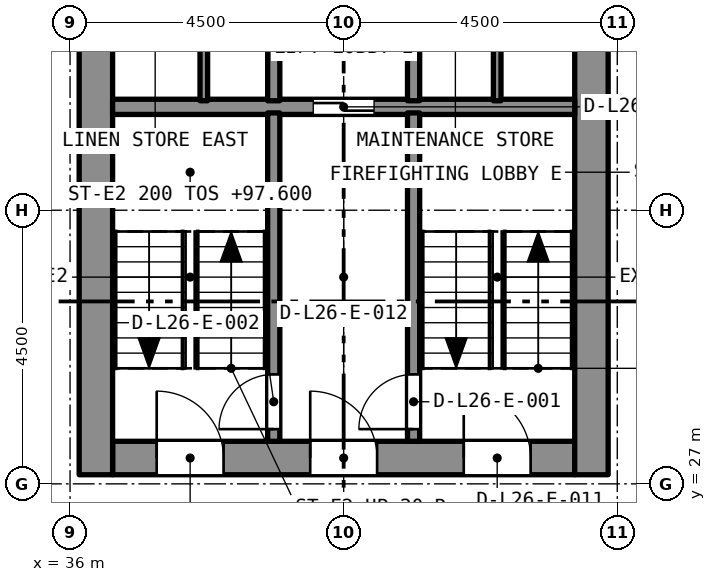
"""IFC4 building model, lengths in metres.
Left out: names, types, materials, properties, quantities, classifications, styles, units other than length and angle.
Written with IfcOpenShell. Run it as: python <this file> out.ifc"""

import sys

from ifc_helpers import new_model, si_unit, direction, frame, frame_2d, origin, place, context, subcontext, project, spatial, rectangle, extrude, element, fill, save


model = new_model("IFC4")
c1 = context("Model", 3, precision=1e-05, world=origin(), true_north=direction((0.0, 1.0)))
c2 = subcontext(c1, "Body", "Model", "MODEL_VIEW")
j1 = project(units=[si_unit("LENGTHUNIT", "METRE"), si_unit("PLANEANGLEUNIT", "RADIAN")], contexts=[c1])
p1 = place(None, origin())
s1 = spatial("IfcSite", under=j1, at=p1, CompositionType="ELEMENT")
p2 = place(p1, origin())
s2 = spatial("IfcBuilding", under=s1, at=p2, CompositionType="ELEMENT")
p3 = place(p2, frame((0.0, 0.0, 96.0)))
s3 = spatial("IfcBuildingStorey", under=s2, at=p3, CompositionType="ELEMENT", Elevation=96.0)
p4 = place(p3, frame((36.7, 27.425, 0.0), z_axis=(0.0, 0.0, 1.0), x_axis=(1.0, 0.0, 0.0)))
e1 = element("IfcWall", 1, at=p4, inside=s3, PredefinedType="SOLIDWALL", context=c2, shape_type="SweptSolid", body=[
    extrude(rectangle(XDim=7.6, YDim=0.55, at=frame_2d((3.8, 0.0))), origin(), (0.0, 0.0, 1.0), 3.2),
])
p5 = place(p4, frame((5.775, 0.0, 0.0)))
e2 = element("IfcOpeningElement", 2, at=p5, cuts=e1, PredefinedType="OPENING", context=c2, shape_type="SweptSolid", body=[
    extrude(rectangle(XDim=1.1, YDim=2.1, at=frame_2d((0.55, 1.05))), frame((0.0, 0.285, 0.0), z_axis=(0.0, -1.0, 0.0), x_axis=(1.0, 0.0, 0.0)), (0.0, 0.0, 1.0), 0.57),
])
p6 = place(p4, frame((3.25, 0.0, 0.0)))
e3 = element("IfcOpeningElement", 3, at=p6, cuts=e1, PredefinedType="OPENING", context=c2, shape_type="SweptSolid", body=[
    extrude(rectangle(XDim=1.1, YDim=2.1, at=frame_2d((0.55, 1.05))), frame((0.0, 0.285, 0.0), z_axis=(0.0, -1.0, 0.0), x_axis=(1.0, 0.0, 0.0)), (0.0, 0.0, 1.0), 0.57),
])
p7 = place(p4, frame((0.725, 0.0, 0.0)))
e4 = element("IfcOpeningElement", 4, at=p7, cuts=e1, PredefinedType="OPENING", context=c2, shape_type="SweptSolid", body=[
    extrude(rectangle(XDim=1.1, YDim=2.1, at=frame_2d((0.55, 1.05))), frame((0.0, 0.285, 0.0), z_axis=(0.0, -1.0, 0.0), x_axis=(1.0, 0.0, 0.0)), (0.0, 0.0, 1.0), 0.57),
])
p8 = place(p3, frame((36.425, 27.15, 0.0), z_axis=(0.0, 0.0, 1.0), x_axis=(0.0, 1.0, 0.0)))
e5 = element("IfcWall", 5, at=p8, inside=s3, PredefinedType="SOLIDWALL", context=c2, shape_type="SweptSolid", body=[
    extrude(rectangle(XDim=13.2, YDim=0.55, at=frame_2d((6.6, 0.0))), origin(), (0.0, 0.0, 1.0), 3.2),
])
p9 = place(p8, frame((8.8, 0.0, 0.0)))
e6 = element("IfcOpeningElement", 6, at=p9, cuts=e5, PredefinedType="OPENING", context=c2, shape_type="SweptSolid", body=[
    extrude(rectangle(XDim=1.2, YDim=2.1, at=frame_2d((0.6, 1.05))), frame((0.0, 0.285, 0.0), z_axis=(0.0, -1.0, 0.0), x_axis=(1.0, 0.0, 0.0)), (0.0, 0.0, 1.0), 0.57),
])
p10 = place(p3, frame((44.575, 27.15, 0.0), z_axis=(0.0, 0.0, 1.0), x_axis=(0.0, 1.0, 0.0)))
e7 = element("IfcWall", 7, at=p10, inside=s3, PredefinedType="SOLIDWALL", context=c2, shape_type="SweptSolid", body=[
    extrude(rectangle(XDim=13.2, YDim=0.55, at=frame_2d((6.6, 0.0))), origin(), (0.0, 0.0, 1.0), 3.2),
])
p11 = place(p10, frame((8.8, 0.0, 0.0)))
e8 = element("IfcOpeningElement", 8, at=p11, cuts=e7, PredefinedType="OPENING", context=c2, shape_type="SweptSolid", body=[
    extrude(rectangle(XDim=1.2, YDim=2.1, at=frame_2d((0.6, 1.05))), frame((0.0, 0.285, 0.0), z_axis=(0.0, -1.0, 0.0), x_axis=(1.0, 0.0, 0.0)), (0.0, 0.0, 1.0), 0.57),
])
p12 = place(p3, frame((36.7, 33.2, 0.0), z_axis=(0.0, 0.0, 1.0), x_axis=(1.0, 0.0, 0.0)))
e9 = element("IfcWall", 9, at=p12, inside=s3, PredefinedType="SOLIDWALL", context=c2, shape_type="SweptSolid", body=[
    extrude(rectangle(XDim=7.6, YDim=0.25, at=frame_2d((3.8, 0.0))), origin(), (0.0, 0.0, 1.0), 2.9),
])
p13 = place(p12, frame((3.3, 0.0, 0.0)))
e10 = element("IfcOpeningElement", 10, at=p13, cuts=e9, PredefinedType="OPENING", context=c2, shape_type="SweptSolid", body=[
    extrude(rectangle(XDim=1.0, YDim=2.1, at=frame_2d((0.5, 1.05))), frame((0.0, 0.135, 0.0), z_axis=(0.0, -1.0, 0.0), x_axis=(1.0, 0.0, 0.0)), (0.0, 0.0, 1.0), 0.27),
])
p14 = place(p3, frame((41.65, 27.7, 0.0), z_axis=(0.0, 0.0, 1.0), x_axis=(0.0, 1.0, 0.0)))
e11 = element("IfcWall", 11, at=p14, inside=s3, PredefinedType="SOLIDWALL", context=c2, shape_type="SweptSolid", body=[
    extrude(rectangle(XDim=5.4, YDim=0.2, at=frame_2d((2.7, 0.0))), origin(), (0.0, 0.0, 1.0), 2.9),
])
p15 = place(p14, frame((0.2, 0.0, 0.0)))
e12 = element("IfcOpeningElement", 12, at=p15, cuts=e11, PredefinedType="OPENING", context=c2, shape_type="SweptSolid", body=[
    extrude(rectangle(XDim=0.9, YDim=2.1, at=frame_2d((0.45, 1.05))), frame((0.0, 0.11, 0.0), z_axis=(0.0, -1.0, 0.0), x_axis=(1.0, 0.0, 0.0)), (0.0, 0.0, 1.0), 0.22),
])
p16 = place(p3, frame((39.35, 27.7, 0.0), z_axis=(0.0, 0.0, 1.0), x_axis=(0.0, 1.0, 0.0)))
e13 = element("IfcWall", 13, at=p16, inside=s3, PredefinedType="SOLIDWALL", context=c2, shape_type="SweptSolid", body=[
    extrude(rectangle(XDim=5.4, YDim=0.2, at=frame_2d((2.7, 0.0))), origin(), (0.0, 0.0, 1.0), 2.9),
])
p17 = place(p16, frame((0.2, 0.0, 0.0)))
e14 = element("IfcOpeningElement", 14, at=p17, cuts=e13, PredefinedType="OPENING", context=c2, shape_type="SweptSolid", body=[
    extrude(rectangle(XDim=0.9, YDim=2.1, at=frame_2d((0.45, 1.05))), frame((0.0, 0.11, 0.0), z_axis=(0.0, -1.0, 0.0), x_axis=(1.0, 0.0, 0.0)), (0.0, 0.0, 1.0), 0.22),
])
for number, where, z_axis, x_axis in (
    (15, (41.65, 33.3, 0.0), (0.0, 0.0, 1.0), (0.0, 1.0, 0.0)),
    (16, (39.35, 33.3, 0.0), (0.0, 0.0, 1.0), (0.0, 1.0, 0.0)),
):
    element("IfcWall", number, at=place(p3, frame(where, z_axis=z_axis, x_axis=x_axis)), inside=s3, PredefinedType="SOLIDWALL", context=c2, shape_type="SweptSolid", body=[
        extrude(rectangle(XDim=2.3, YDim=0.2, at=frame_2d((1.15, 0.0))), origin(), (0.0, 0.0, 1.0), 2.9),
    ])
for number, where, z_axis, x_axis in (
    (17, (43.025, 33.3, 0.0), (0.0, 0.0, 1.0), (0.0, 1.0, 0.0)),
    (18, (38.2, 33.3, 0.0), (0.0, 0.0, 1.0), (0.0, 1.0, 0.0)),
):
    element("IfcWall", number, at=place(p3, frame(where, z_axis=z_axis, x_axis=x_axis)), inside=s3, PredefinedType="PARTITIONING", context=c2, shape_type="SweptSolid", body=[
        extrude(rectangle(XDim=2.3, YDim=0.125, at=frame_2d((1.15, 0.0))), origin(), (0.0, 0.0, 1.0), 2.9),
    ])
p18 = place(p15, origin())
e19 = element("IfcDoor", 19, at=p18, inside=s3, OperationType="SINGLE_SWING_LEFT", PredefinedType="DOOR", context=c2, shape_type="SweptSolid", body=[
    extrude(rectangle(XDim=0.9, YDim=2.1, at=frame_2d((0.45, 1.05))), frame((0.0, 0.025, 0.0), z_axis=(0.0, -1.0, 0.0), x_axis=(1.0, 0.0, 0.0)), (0.0, 0.0, 1.0), 0.05),
])
fill(e12, e19)
p19 = place(p17, origin())
e20 = element("IfcDoor", 20, at=p19, inside=s3, OperationType="SINGLE_SWING_LEFT", PredefinedType="DOOR", context=c2, shape_type="SweptSolid", body=[
    extrude(rectangle(XDim=0.9, YDim=2.1, at=frame_2d((0.45, 1.05))), frame((0.0, 0.025, 0.0), z_axis=(0.0, -1.0, 0.0), x_axis=(1.0, 0.0, 0.0)), (0.0, 0.0, 1.0), 0.05),
])
fill(e14, e20)
p20 = place(p13, origin())
e21 = element("IfcDoor", 21, at=p20, inside=s3, OperationType="SLIDING_TO_LEFT", PredefinedType="DOOR", context=c2, shape_type="SweptSolid", body=[
    extrude(rectangle(XDim=1.0, YDim=2.1, at=frame_2d((0.5, 1.05))), frame((0.0, 0.025, 0.0), z_axis=(0.0, -1.0, 0.0), x_axis=(1.0, 0.0, 0.0)), (0.0, 0.0, 1.0), 0.05),
])
fill(e10, e21)
p21 = place(p5, origin())
e22 = element("IfcDoor", 22, at=p21, inside=s3, OperationType="SINGLE_SWING_LEFT", PredefinedType="DOOR", context=c2, shape_type="SweptSolid", body=[
    extrude(rectangle(XDim=1.1, YDim=2.1, at=frame_2d((0.55, 1.05))), frame((0.0, 0.025, 0.0), z_axis=(0.0, -1.0, 0.0), x_axis=(1.0, 0.0, 0.0)), (0.0, 0.0, 1.0), 0.05),
])
fill(e2, e22)
p22 = place(p6, origin())
e23 = element("IfcDoor", 23, at=p22, inside=s3, OperationType="SINGLE_SWING_LEFT", PredefinedType="DOOR", context=c2, shape_type="SweptSolid", body=[
    extrude(rectangle(XDim=1.1, YDim=2.1, at=frame_2d((0.55, 1.05))), frame((0.0, 0.025, 0.0), z_axis=(0.0, -1.0, 0.0), x_axis=(1.0, 0.0, 0.0)), (0.0, 0.0, 1.0), 0.05),
])
fill(e3, e23)
p23 = place(p7, origin())
e24 = element("IfcDoor", 24, at=p23, inside=s3, OperationType="SINGLE_SWING_LEFT", PredefinedType="DOOR", context=c2, shape_type="SweptSolid", body=[
    extrude(rectangle(XDim=1.1, YDim=2.1, at=frame_2d((0.55, 1.05))), frame((0.0, 0.025, 0.0), z_axis=(0.0, -1.0, 0.0), x_axis=(1.0, 0.0, 0.0)), (0.0, 0.0, 1.0), 0.05),
])
fill(e4, e24)
save(model, sys.argv[1])
